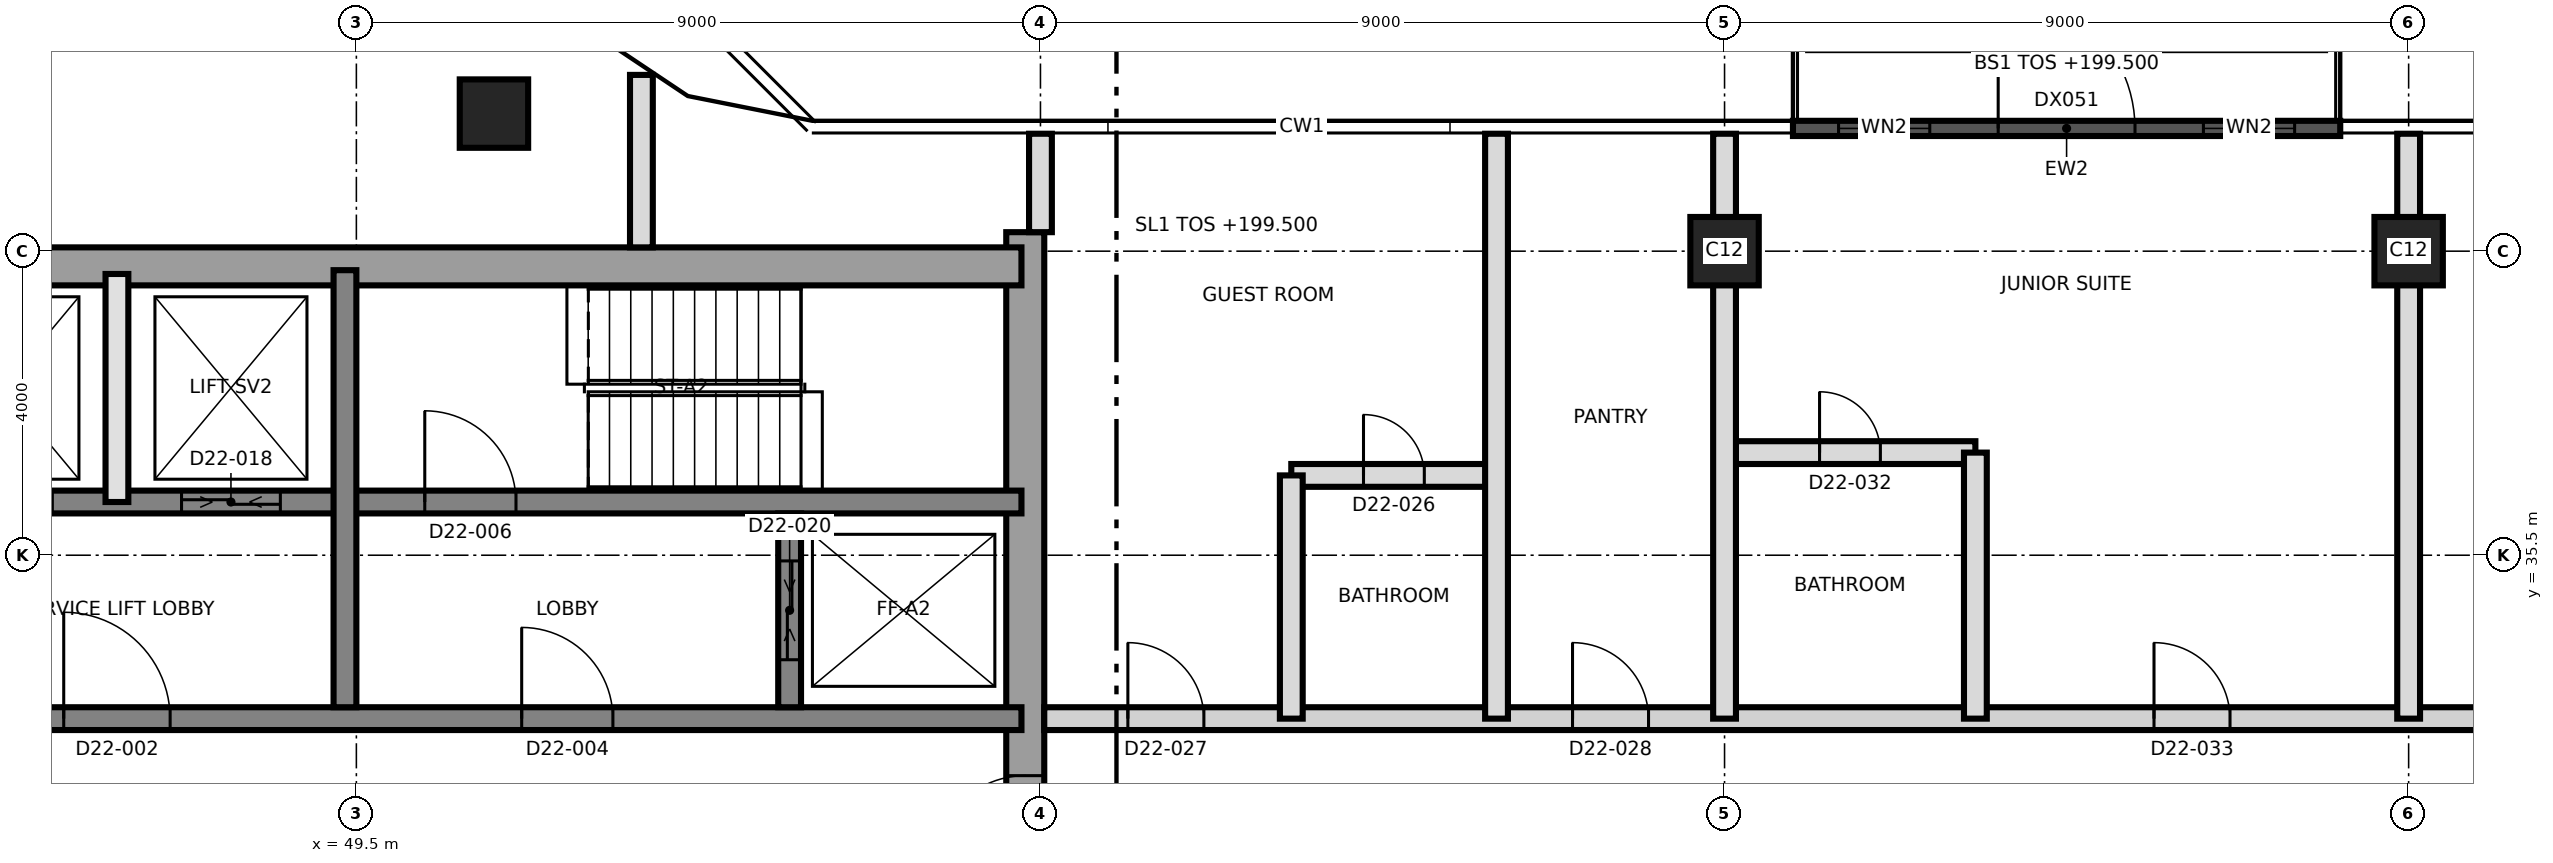
"""IFC4 building model, lengths in metres.
Left out: names, types, materials, properties, quantities, classifications, styles, units other than length and angle.
Written with IfcOpenShell. Run it as: python <this file> out.ifc"""

import sys

from ifc_helpers import new_model, si_unit, direction, frame, frame_2d, origin, origin_2d, place, context, subcontext, project, spatial, rectangle, extrude, element, fill, save


model = new_model("IFC4")
c1 = context("Model", 3, precision=1e-05, world=origin(), true_north=direction((0.0, 1.0)))
c2 = subcontext(c1, "Body", "Model", "MODEL_VIEW")
j1 = project(units=[si_unit("LENGTHUNIT", "METRE"), si_unit("PLANEANGLEUNIT", "RADIAN")], contexts=[c1])
p1 = place(None, origin())
s1 = spatial("IfcSite", under=j1, at=p1, CompositionType="ELEMENT")
p2 = place(p1, origin())
s2 = spatial("IfcBuilding", under=s1, at=p2, CompositionType="ELEMENT")
p3 = place(p2, frame((0.0, 0.0, 199.5)))
s3 = spatial("IfcBuildingStorey", under=s2, at=p3, CompositionType="ELEMENT", Elevation=199.5)
p4 = place(p3, frame((58.3, 21.25, 0.0), z_axis=(0.0, 0.0, 1.0), x_axis=(0.0, 1.0, 0.0)))
e1 = element("IfcWall", 1, at=p4, inside=s3, PredefinedType="SHEAR", context=c2, shape_type="SweptSolid", body=[
    extrude(rectangle(XDim=18.5, YDim=0.5, at=frame_2d((9.25, 0.0))), origin(), (0.0, 0.0, 1.0), 3.7),
])
p5 = place(p4, frame((10.15, 0.0, 0.0)))
e2 = element("IfcOpeningElement", 2, at=p5, cuts=e1, PredefinedType="OPENING", context=c2, shape_type="SweptSolid", body=[
    extrude(rectangle(XDim=1.2, YDim=2.1, at=frame_2d((0.6, 1.05))), frame((0.0, 0.26, 0.0), z_axis=(0.0, -1.0, 0.0), x_axis=(1.0, 0.0, 0.0)), (0.0, 0.0, 1.0), 0.52),
])
p6 = place(p3, frame((31.25, 39.3, 0.0), z_axis=(0.0, 0.0, 1.0), x_axis=(1.0, 0.0, 0.0)))
e3 = element("IfcWall", 3, at=p6, inside=s3, PredefinedType="SHEAR", context=c2, shape_type="SweptSolid", body=[
    extrude(rectangle(XDim=27.0, YDim=0.5, at=frame_2d((13.5, 0.0))), origin(), (0.0, 0.0, 1.0), 3.7),
])
p7 = place(p6, frame((10.45, 0.0, 0.0)))
e4 = element("IfcOpeningElement", 4, at=p7, cuts=e3, PredefinedType="OPENING", context=c2, shape_type="SweptSolid", body=[
    extrude(rectangle(XDim=1.2, YDim=2.1, at=frame_2d((0.6, 1.05))), frame((0.0, 0.26, 0.0), z_axis=(0.0, -1.0, 0.0), x_axis=(1.0, 0.0, 0.0)), (0.0, 0.0, 1.0), 0.52),
])
p8 = place(p3, frame((31.75, 33.35, 0.0), z_axis=(0.0, 0.0, 1.0), x_axis=(1.0, 0.0, 0.0)))
e5 = element("IfcWall", 5, at=p8, inside=s3, PredefinedType="SHEAR", context=c2, shape_type="SweptSolid", body=[
    extrude(rectangle(XDim=26.5, YDim=0.3, at=frame_2d((13.25, 0.0))), origin(), (0.0, 0.0, 1.0), 3.7),
])
p9 = place(p8, frame((13.9, 0.0, 0.0)))
e6 = element("IfcOpeningElement", 6, at=p9, cuts=e5, PredefinedType="OPENING", context=c2, shape_type="SweptSolid", body=[
    extrude(rectangle(XDim=1.4, YDim=2.1, at=frame_2d((0.7, 1.05))), frame((0.0, 0.16, 0.0), z_axis=(0.0, -1.0, 0.0), x_axis=(1.0, 0.0, 0.0)), (0.0, 0.0, 1.0), 0.32),
])
p10 = place(p8, frame((5.375, 0.0, 0.0)))
e7 = element("IfcOpeningElement", 7, at=p10, cuts=e5, PredefinedType="OPENING", context=c2, shape_type="SweptSolid", body=[
    extrude(rectangle(XDim=1.2, YDim=2.1, at=frame_2d((0.6, 1.05))), frame((0.0, 0.16, 0.0), z_axis=(0.0, -1.0, 0.0), x_axis=(1.0, 0.0, 0.0)), (0.0, 0.0, 1.0), 0.32),
])
p11 = place(p8, frame((19.925, 0.0, 0.0)))
e8 = element("IfcOpeningElement", 8, at=p11, cuts=e5, PredefinedType="OPENING", context=c2, shape_type="SweptSolid", body=[
    extrude(rectangle(XDim=1.2, YDim=2.1, at=frame_2d((0.6, 1.05))), frame((0.0, 0.16, 0.0), z_axis=(0.0, -1.0, 0.0), x_axis=(1.0, 0.0, 0.0)), (0.0, 0.0, 1.0), 0.32),
])
p12 = place(p3, frame((43.5, 36.2, 0.0), z_axis=(0.0, 0.0, 1.0), x_axis=(1.0, 0.0, 0.0)))
e9 = element("IfcWall", 9, at=p12, inside=s3, PredefinedType="SHEAR", context=c2, shape_type="SweptSolid", body=[
    extrude(rectangle(XDim=14.75, YDim=0.3, at=frame_2d((7.375, 0.0))), origin(), (0.0, 0.0, 1.0), 3.7),
])
p13 = place(p12, frame((6.9, 0.0, 0.0)))
e10 = element("IfcOpeningElement", 10, at=p13, cuts=e9, PredefinedType="OPENING", context=c2, shape_type="SweptSolid", body=[
    extrude(rectangle(XDim=1.2, YDim=2.1, at=frame_2d((0.6, 1.05))), frame((0.0, 0.16, 0.0), z_axis=(0.0, -1.0, 0.0), x_axis=(1.0, 0.0, 0.0)), (0.0, 0.0, 1.0), 0.32),
])
p14 = place(p12, frame((0.7, 0.0, 0.0)))
e11 = element("IfcOpeningElement", 11, at=p14, cuts=e9, PredefinedType="OPENING", context=c2, shape_type="SweptSolid", body=[
    extrude(rectangle(XDim=1.3, YDim=2.4, at=frame_2d((0.65, 1.2))), frame((0.0, 0.16, 0.0), z_axis=(0.0, -1.0, 0.0), x_axis=(1.0, 0.0, 0.0)), (0.0, 0.0, 1.0), 0.32),
])
p15 = place(p12, frame((3.7, 0.0, 0.0)))
e12 = element("IfcOpeningElement", 12, at=p15, cuts=e9, PredefinedType="OPENING", context=c2, shape_type="SweptSolid", body=[
    extrude(rectangle(XDim=1.3, YDim=2.4, at=frame_2d((0.65, 1.2))), frame((0.0, 0.16, 0.0), z_axis=(0.0, -1.0, 0.0), x_axis=(1.0, 0.0, 0.0)), (0.0, 0.0, 1.0), 0.32),
])
p16 = place(p3, frame((49.35, 33.5, 0.0), z_axis=(0.0, 0.0, 1.0), x_axis=(0.0, 1.0, 0.0)))
e13 = element("IfcWall", 13, at=p16, inside=s3, PredefinedType="SHEAR", context=c2, shape_type="SweptSolid", body=[
    extrude(rectangle(XDim=5.75, YDim=0.3, at=frame_2d((2.875, 0.0))), origin(), (0.0, 0.0, 1.0), 3.7),
])
p17 = place(p3, frame((55.2, 33.5, 0.0), z_axis=(0.0, 0.0, 1.0), x_axis=(0.0, 1.0, 0.0)))
e14 = element("IfcWall", 14, at=p17, inside=s3, PredefinedType="SHEAR", context=c2, shape_type="SweptSolid", body=[
    extrude(rectangle(XDim=2.55, YDim=0.3, at=frame_2d((1.275, 0.0))), origin(), (0.0, 0.0, 1.0), 3.7),
])
p18 = place(p17, frame((0.625, 0.0, 0.0)))
e15 = element("IfcOpeningElement", 15, at=p18, cuts=e14, PredefinedType="OPENING", context=c2, shape_type="SweptSolid", body=[
    extrude(rectangle(XDim=1.3, YDim=2.4, at=frame_2d((0.65, 1.2))), frame((0.0, 0.16, 0.0), z_axis=(0.0, -1.0, 0.0), x_axis=(1.0, 0.0, 0.0)), (0.0, 0.0, 1.0), 0.32),
])
for number, where, z_axis, x_axis in (
    (16, (67.5, 39.5, 0.0), (0.0, 0.0, 1.0), (1.0, 0.0, 0.0)),
    (17, (76.5, 39.5, 0.0), (0.0, 0.0, 1.0), (1.0, 0.0, 0.0)),
    (18, (51.31, 41.31, 0.0), (0.0, 0.0, 1.0), (1.0, 0.0, 0.0)),
):
    element("IfcColumn", number, at=place(p3, frame(where, z_axis=z_axis, x_axis=x_axis)), inside=s3, PredefinedType="COLUMN", context=c2, shape_type="SweptSolid", body=[
        extrude(rectangle(XDim=0.9, YDim=0.9, at=origin_2d()), origin(), (0.0, 0.0, 1.0), 3.7),
    ])
p19 = place(p3, frame((68.4, 41.115, 0.0), z_axis=(0.0, 0.0, 1.0), x_axis=(1.0, 0.0, 0.0)))
e19 = element("IfcWall", 19, at=p19, inside=s3, PredefinedType="SOLIDWALL", context=c2, shape_type="SweptSolid", body=[
    extrude(rectangle(XDim=7.2, YDim=0.2, at=frame_2d((3.6, 0.0))), origin(), (0.0, 0.0, 1.0), 3.4),
])
p20 = place(p19, frame((2.7, 0.0, 0.0)))
e20 = element("IfcOpeningElement", 20, at=p20, cuts=e19, PredefinedType="OPENING", context=c2, shape_type="SweptSolid", body=[
    extrude(rectangle(XDim=1.8, YDim=2.4, at=frame_2d((0.9, 1.2))), frame((0.0, 0.11, 0.0), z_axis=(0.0, -1.0, 0.0), x_axis=(1.0, 0.0, 0.0)), (0.0, 0.0, 1.0), 0.22),
])
p21 = place(p19, frame((5.4, 0.0, 0.9)))
e21 = element("IfcOpeningElement", 21, at=p21, cuts=e19, PredefinedType="OPENING", context=c2, shape_type="SweptSolid", body=[
    extrude(rectangle(XDim=1.2, YDim=2.1, at=frame_2d((0.6, 1.05))), frame((0.0, 0.11, 0.0), z_axis=(0.0, -1.0, 0.0), x_axis=(1.0, 0.0, 0.0)), (0.0, 0.0, 1.0), 0.22),
])
p22 = place(p19, frame((0.6, 0.0, 0.9)))
e22 = element("IfcOpeningElement", 22, at=p22, cuts=e19, PredefinedType="OPENING", context=c2, shape_type="SweptSolid", body=[
    extrude(rectangle(XDim=1.2, YDim=2.1, at=frame_2d((0.6, 1.05))), frame((0.0, 0.11, 0.0), z_axis=(0.0, -1.0, 0.0), x_axis=(1.0, 0.0, 0.0)), (0.0, 0.0, 1.0), 0.22),
])
p23 = place(p3, frame((46.35, 36.2, 0.0), z_axis=(0.0, 0.0, 1.0), x_axis=(0.0, 1.0, 0.0)))
e23 = element("IfcWall", 23, at=p23, inside=s3, PredefinedType="SOLIDWALL", context=c2, shape_type="SweptSolid", body=[
    extrude(rectangle(XDim=3.0, YDim=0.3, at=frame_2d((1.5, 0.0))), origin(), (0.0, 0.0, 1.0), 3.4),
])
p24 = place(p3, frame((58.55, 33.35, 0.0), z_axis=(0.0, 0.0, 1.0), x_axis=(1.0, 0.0, 0.0)))
e24 = element("IfcWall", 24, at=p24, inside=s3, PredefinedType="PARTITIONING", context=c2, shape_type="SweptSolid", body=[
    extrude(rectangle(XDim=26.78, YDim=0.3, at=frame_2d((13.39, 0.0))), origin(), (0.0, 0.0, 1.0), 3.4),
])
p25 = place(p24, frame((1.1, 0.0, 0.0)))
e25 = element("IfcOpeningElement", 25, at=p25, cuts=e24, PredefinedType="OPENING", context=c2, shape_type="SweptSolid", body=[
    extrude(rectangle(XDim=1.0, YDim=2.1, at=frame_2d((0.5, 1.05))), frame((0.0, 0.16, 0.0), z_axis=(0.0, -1.0, 0.0), x_axis=(1.0, 0.0, 0.0)), (0.0, 0.0, 1.0), 0.32),
])
p26 = place(p24, frame((6.95, 0.0, 0.0)))
e26 = element("IfcOpeningElement", 26, at=p26, cuts=e24, PredefinedType="OPENING", context=c2, shape_type="SweptSolid", body=[
    extrude(rectangle(XDim=1.0, YDim=2.1, at=frame_2d((0.5, 1.05))), frame((0.0, 0.16, 0.0), z_axis=(0.0, -1.0, 0.0), x_axis=(1.0, 0.0, 0.0)), (0.0, 0.0, 1.0), 0.32),
])
p27 = place(p24, frame((14.6, 0.0, 0.0)))
e27 = element("IfcOpeningElement", 27, at=p27, cuts=e24, PredefinedType="OPENING", context=c2, shape_type="SweptSolid", body=[
    extrude(rectangle(XDim=1.0, YDim=2.4, at=frame_2d((0.5, 1.2))), frame((0.0, 0.16, 0.0), z_axis=(0.0, -1.0, 0.0), x_axis=(1.0, 0.0, 0.0)), (0.0, 0.0, 1.0), 0.32),
])
p28 = place(p24, frame((20.3, 0.0, 0.0)))
e28 = element("IfcOpeningElement", 28, at=p28, cuts=e24, PredefinedType="OPENING", context=c2, shape_type="SweptSolid", body=[
    extrude(rectangle(XDim=1.0, YDim=2.4, at=frame_2d((0.5, 1.2))), frame((0.0, 0.16, 0.0), z_axis=(0.0, -1.0, 0.0), x_axis=(1.0, 0.0, 0.0)), (0.0, 0.0, 1.0), 0.32),
])
p29 = place(p3, frame((61.8, 36.55, 0.0), z_axis=(0.0, 0.0, 1.0), x_axis=(1.0, 0.0, 0.0)))
e29 = element("IfcWall", 29, at=p29, inside=s3, PredefinedType="PARTITIONING", context=c2, shape_type="SweptSolid", body=[
    extrude(rectangle(XDim=2.7, YDim=0.3, at=frame_2d((1.35, 0.0))), origin(), (0.0, 0.0, 1.0), 3.4),
])
p30 = place(p29, frame((0.95, 0.0, 0.0)))
e30 = element("IfcOpeningElement", 30, at=p30, cuts=e29, PredefinedType="OPENING", context=c2, shape_type="SweptSolid", body=[
    extrude(rectangle(XDim=0.8, YDim=2.1, at=frame_2d((0.4, 1.05))), frame((0.0, 0.16, 0.0), z_axis=(0.0, -1.0, 0.0), x_axis=(1.0, 0.0, 0.0)), (0.0, 0.0, 1.0), 0.32),
])
p31 = place(p3, frame((67.5, 36.85, 0.0), z_axis=(0.0, 0.0, 1.0), x_axis=(1.0, 0.0, 0.0)))
e31 = element("IfcWall", 31, at=p31, inside=s3, PredefinedType="PARTITIONING", context=c2, shape_type="SweptSolid", body=[
    extrude(rectangle(XDim=3.3, YDim=0.3, at=frame_2d((1.65, 0.0))), origin(), (0.0, 0.0, 1.0), 3.4),
])
p32 = place(p31, frame((1.25, 0.0, 0.0)))
e32 = element("IfcOpeningElement", 32, at=p32, cuts=e31, PredefinedType="OPENING", context=c2, shape_type="SweptSolid", body=[
    extrude(rectangle(XDim=0.8, YDim=2.1, at=frame_2d((0.4, 1.05))), frame((0.0, 0.16, 0.0), z_axis=(0.0, -1.0, 0.0), x_axis=(1.0, 0.0, 0.0)), (0.0, 0.0, 1.0), 0.32),
])
p33 = place(p3, frame((53.25, 39.55, 0.0), z_axis=(0.0, 0.0, 1.0), x_axis=(0.0, 1.0, 0.0)))
e33 = element("IfcWall", 33, at=p33, inside=s3, PredefinedType="PARTITIONING", context=c2, shape_type="SweptSolid", body=[
    extrude(rectangle(XDim=2.269, YDim=0.3, at=frame_2d((1.135, 0.0))), origin(), (0.0, 0.0, 1.0), 3.4),
])
p34 = place(p3, frame((58.5, 39.75, 0.0), z_axis=(0.0, 0.0, 1.0), x_axis=(0.0, 1.0, 0.0)))
e34 = element("IfcWall", 34, at=p34, inside=s3, PredefinedType="PARTITIONING", context=c2, shape_type="SweptSolid", body=[
    extrude(rectangle(XDim=1.295, YDim=0.3, at=frame_2d((0.647, 0.0))), origin(), (0.0, 0.0, 1.0), 3.4),
])
p35 = place(p3, frame((61.8, 33.35, 0.0), z_axis=(0.0, 0.0, 1.0), x_axis=(0.0, 1.0, 0.0)))
e35 = element("IfcWall", 35, at=p35, inside=s3, PredefinedType="PARTITIONING", context=c2, shape_type="SweptSolid", body=[
    extrude(rectangle(XDim=3.2, YDim=0.3, at=frame_2d((1.6, 0.0))), origin(), (0.0, 0.0, 1.0), 3.4),
])
for number, where, z_axis, x_axis in (
    (36, (64.5, 33.35, 0.0), (0.0, 0.0, 1.0), (0.0, 1.0, 0.0)),
    (37, (67.5, 33.35, 0.0), (0.0, 0.0, 1.0), (0.0, 1.0, 0.0)),
):
    element("IfcWall", number, at=place(p3, frame(where, z_axis=z_axis, x_axis=x_axis)), inside=s3, PredefinedType="PARTITIONING", context=c2, shape_type="SweptSolid", body=[
        extrude(rectangle(XDim=7.695, YDim=0.3, at=frame_2d((3.847, 0.0))), origin(), (0.0, 0.0, 1.0), 3.4),
    ])
p36 = place(p3, frame((70.8, 33.35, 0.0), z_axis=(0.0, 0.0, 1.0), x_axis=(0.0, 1.0, 0.0)))
e38 = element("IfcWall", 38, at=p36, inside=s3, PredefinedType="PARTITIONING", context=c2, shape_type="SweptSolid", body=[
    extrude(rectangle(XDim=3.5, YDim=0.3, at=frame_2d((1.75, 0.0))), origin(), (0.0, 0.0, 1.0), 3.4),
])
p37 = place(p3, frame((76.5, 33.35, 0.0), z_axis=(0.0, 0.0, 1.0), x_axis=(0.0, 1.0, 0.0)))
e39 = element("IfcWall", 39, at=p37, inside=s3, PredefinedType="PARTITIONING", context=c2, shape_type="SweptSolid", body=[
    extrude(rectangle(XDim=7.695, YDim=0.3, at=frame_2d((3.847, 0.0))), origin(), (0.0, 0.0, 1.0), 3.4),
])
p38 = place(p20, origin())
e40 = element("IfcDoor", 40, at=p38, inside=s3, OperationType="SINGLE_SWING_LEFT", PredefinedType="DOOR", context=c2, shape_type="SweptSolid", body=[
    extrude(rectangle(XDim=1.8, YDim=2.4, at=frame_2d((0.9, 1.2))), frame((0.0, 0.025, 0.0), z_axis=(0.0, -1.0, 0.0), x_axis=(1.0, 0.0, 0.0)), (0.0, 0.0, 1.0), 0.05),
])
fill(e20, e40)
p39 = place(p21, origin())
e41 = element("IfcWindow", 41, at=p39, inside=s3, PartitioningType="SINGLE_PANEL", PredefinedType="WINDOW", context=c2, shape_type="SweptSolid", body=[
    extrude(rectangle(XDim=1.2, YDim=2.1, at=frame_2d((0.6, 1.05))), frame((0.0, 0.03, 0.0), z_axis=(0.0, -1.0, 0.0), x_axis=(1.0, 0.0, 0.0)), (0.0, 0.0, 1.0), 0.06),
])
fill(e21, e41)
p40 = place(p22, origin())
e42 = element("IfcWindow", 42, at=p40, inside=s3, PartitioningType="SINGLE_PANEL", PredefinedType="WINDOW", context=c2, shape_type="SweptSolid", body=[
    extrude(rectangle(XDim=1.2, YDim=2.1, at=frame_2d((0.6, 1.05))), frame((0.0, 0.03, 0.0), z_axis=(0.0, -1.0, 0.0), x_axis=(1.0, 0.0, 0.0)), (0.0, 0.0, 1.0), 0.06),
])
fill(e22, e42)
p41 = place(p9, origin())
e43 = element("IfcDoor", 43, at=p41, inside=s3, OperationType="SINGLE_SWING_RIGHT", PredefinedType="DOOR", context=c2, shape_type="SweptSolid", body=[
    extrude(rectangle(XDim=1.4, YDim=2.1, at=frame_2d((0.7, 1.05))), frame((0.0, 0.025, 0.0), z_axis=(0.0, -1.0, 0.0), x_axis=(1.0, 0.0, 0.0)), (0.0, 0.0, 1.0), 0.05),
])
fill(e6, e43)
p42 = place(p11, origin())
e44 = element("IfcDoor", 44, at=p42, inside=s3, OperationType="SINGLE_SWING_RIGHT", PredefinedType="DOOR", context=c2, shape_type="SweptSolid", body=[
    extrude(rectangle(XDim=1.2, YDim=2.1, at=frame_2d((0.6, 1.05))), frame((0.0, 0.025, 0.0), z_axis=(0.0, -1.0, 0.0), x_axis=(1.0, 0.0, 0.0)), (0.0, 0.0, 1.0), 0.05),
])
fill(e8, e44)
p43 = place(p13, origin())
e45 = element("IfcDoor", 45, at=p43, inside=s3, OperationType="SINGLE_SWING_LEFT", PredefinedType="DOOR", context=c2, shape_type="SweptSolid", body=[
    extrude(rectangle(XDim=1.2, YDim=2.1, at=frame_2d((0.6, 1.05))), frame((0.0, 0.025, 0.0), z_axis=(0.0, -1.0, 0.0), x_axis=(1.0, 0.0, 0.0)), (0.0, 0.0, 1.0), 0.05),
])
fill(e10, e45)
p44 = place(p5, origin())
e46 = element("IfcDoor", 46, at=p44, inside=s3, OperationType="SINGLE_SWING_LEFT", PredefinedType="DOOR", context=c2, shape_type="SweptSolid", body=[
    extrude(rectangle(XDim=1.2, YDim=2.1, at=frame_2d((0.6, 1.05))), frame((0.0, 0.025, 0.0), z_axis=(0.0, -1.0, 0.0), x_axis=(1.0, 0.0, 0.0)), (0.0, 0.0, 1.0), 0.05),
])
fill(e2, e46)
p45 = place(p15, origin())
e47 = element("IfcDoor", 47, at=p45, inside=s3, OperationType="SLIDING_TO_LEFT", PredefinedType="DOOR", context=c2, shape_type="SweptSolid", body=[
    extrude(rectangle(XDim=1.3, YDim=2.4, at=frame_2d((0.65, 1.2))), frame((0.0, 0.025, 0.0), z_axis=(0.0, -1.0, 0.0), x_axis=(1.0, 0.0, 0.0)), (0.0, 0.0, 1.0), 0.05),
])
fill(e12, e47)
p46 = place(p18, origin())
e48 = element("IfcDoor", 48, at=p46, inside=s3, OperationType="SLIDING_TO_LEFT", PredefinedType="DOOR", context=c2, shape_type="SweptSolid", body=[
    extrude(rectangle(XDim=1.3, YDim=2.4, at=frame_2d((0.65, 1.2))), frame((0.0, 0.025, 0.0), z_axis=(0.0, -1.0, 0.0), x_axis=(1.0, 0.0, 0.0)), (0.0, 0.0, 1.0), 0.05),
])
fill(e15, e48)
p47 = place(p30, origin())
e49 = element("IfcDoor", 49, at=p47, inside=s3, OperationType="SINGLE_SWING_LEFT", PredefinedType="DOOR", context=c2, shape_type="SweptSolid", body=[
    extrude(rectangle(XDim=0.8, YDim=2.1, at=frame_2d((0.4, 1.05))), frame((0.0, 0.025, 0.0), z_axis=(0.0, -1.0, 0.0), x_axis=(1.0, 0.0, 0.0)), (0.0, 0.0, 1.0), 0.05),
])
fill(e30, e49)
p48 = place(p25, origin())
e50 = element("IfcDoor", 50, at=p48, inside=s3, OperationType="SINGLE_SWING_LEFT", PredefinedType="DOOR", context=c2, shape_type="SweptSolid", body=[
    extrude(rectangle(XDim=1.0, YDim=2.1, at=frame_2d((0.5, 1.05))), frame((0.0, 0.025, 0.0), z_axis=(0.0, -1.0, 0.0), x_axis=(1.0, 0.0, 0.0)), (0.0, 0.0, 1.0), 0.05),
])
fill(e25, e50)
p49 = place(p26, origin())
e51 = element("IfcDoor", 51, at=p49, inside=s3, OperationType="SINGLE_SWING_RIGHT", PredefinedType="DOOR", context=c2, shape_type="SweptSolid", body=[
    extrude(rectangle(XDim=1.0, YDim=2.1, at=frame_2d((0.5, 1.05))), frame((0.0, 0.025, 0.0), z_axis=(0.0, -1.0, 0.0), x_axis=(1.0, 0.0, 0.0)), (0.0, 0.0, 1.0), 0.05),
])
fill(e26, e51)
p50 = place(p32, origin())
e52 = element("IfcDoor", 52, at=p50, inside=s3, OperationType="SINGLE_SWING_LEFT", PredefinedType="DOOR", context=c2, shape_type="SweptSolid", body=[
    extrude(rectangle(XDim=0.8, YDim=2.1, at=frame_2d((0.4, 1.05))), frame((0.0, 0.025, 0.0), z_axis=(0.0, -1.0, 0.0), x_axis=(1.0, 0.0, 0.0)), (0.0, 0.0, 1.0), 0.05),
])
fill(e32, e52)
p51 = place(p27, origin())
e53 = element("IfcDoor", 53, at=p51, inside=s3, OperationType="SINGLE_SWING_LEFT", PredefinedType="DOOR", context=c2, shape_type="SweptSolid", body=[
    extrude(rectangle(XDim=1.0, YDim=2.4, at=frame_2d((0.5, 1.2))), frame((0.0, 0.025, 0.0), z_axis=(0.0, -1.0, 0.0), x_axis=(1.0, 0.0, 0.0)), (0.0, 0.0, 1.0), 0.05),
])
fill(e27, e53)
save(model, sys.argv[1])
